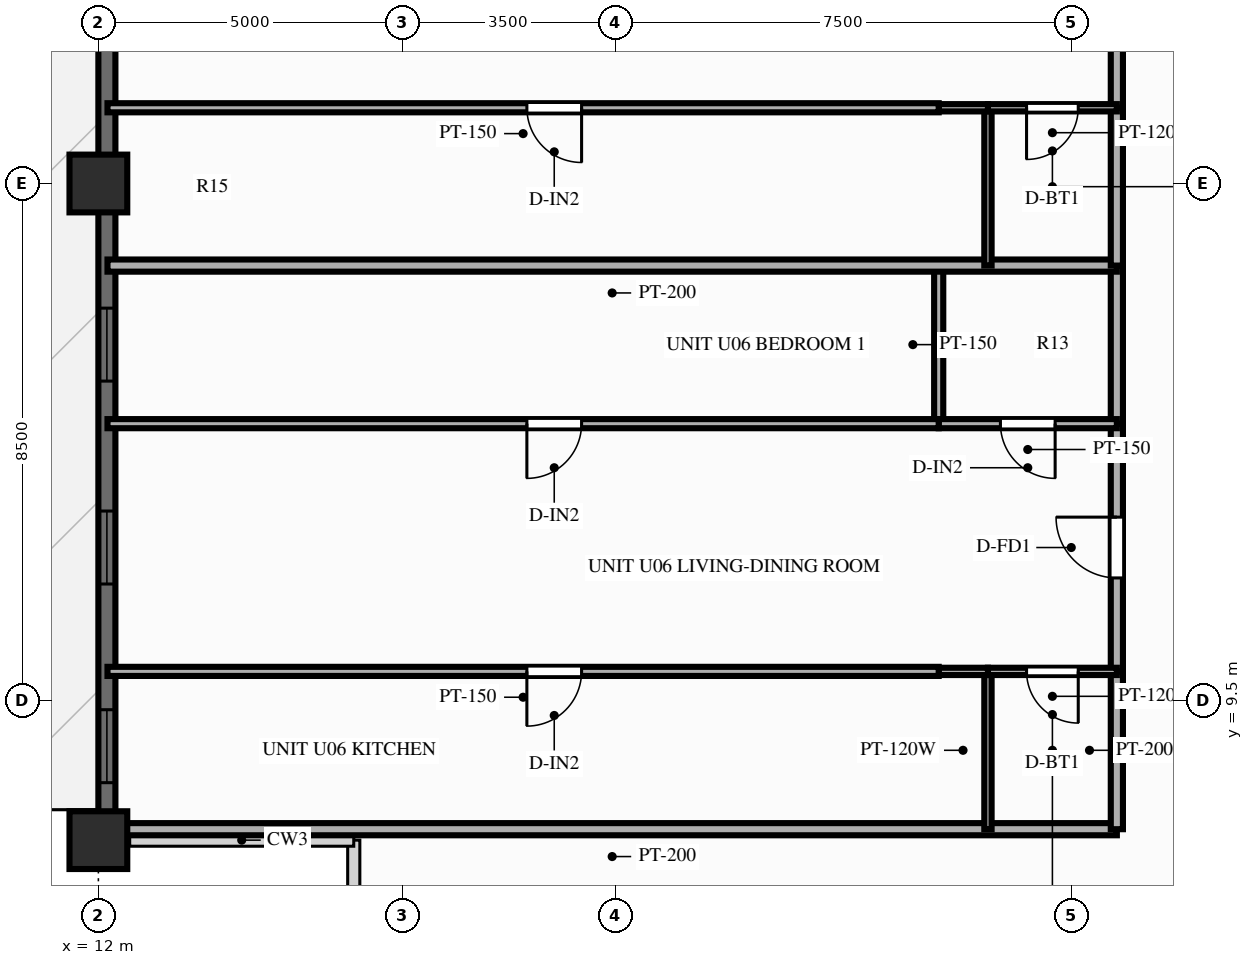
"""IFC4 building model, lengths in metres.
Left out: names, types, materials, properties, quantities, classifications, styles, units other than length and angle.
Written with IfcOpenShell. Run it as: python <this file> out.ifc"""

import sys

from ifc_helpers import new_model, si_unit, direction, frame, frame_2d, origin, origin_2d, place, context, subcontext, project, spatial, rectangle, extrude, source, transform, mapped, element, fill, save


model = new_model("IFC4")
c1 = context("Model", 3, precision=1e-05, world=origin(), true_north=direction((0.0, 1.0)))
c2 = subcontext(c1, "Body", "Model", "MODEL_VIEW")
j1 = project(units=[si_unit("LENGTHUNIT", "METRE"), si_unit("PLANEANGLEUNIT", "RADIAN")], contexts=[c1])
p1 = place(None, origin())
s1 = spatial("IfcSite", under=j1, at=p1, CompositionType="ELEMENT")
p2 = place(p1, origin())
s2 = spatial("IfcBuilding", under=s1, at=p2, CompositionType="ELEMENT")
p3 = place(p2, frame((0.0, 0.0, 107.85)))
s3 = spatial("IfcBuildingStorey", under=s2, at=p3, CompositionType="ELEMENT", Elevation=107.85)
m1 = source(origin(), c2, "Body", "SweptSolid", [
    extrude(rectangle(XDim=0.95, YDim=0.95, at=origin_2d()), origin(), (0.0, 0.0, 1.0), 3.0),
])
for number, where, z_axis, x_axis in (
    (1, (12.0, 18.0, 0.0), (0.0, 0.0, 1.0), (1.0, 0.0, 0.0)),
    (2, (12.0, 7.2, 0.0), (0.0, 0.0, 1.0), (1.0, 0.0, 0.0)),
):
    element("IfcColumn", number, at=place(p3, frame(where, z_axis=z_axis, x_axis=x_axis)), inside=s3, PredefinedType="COLUMN", context=c2, shape_type="MappedRepresentation", body=[
        mapped(m1, transform((0.0, 0.0, 0.0), scale=1.0)),
    ])
p4 = place(p3, frame((12.14, 7.2, 0.0), z_axis=(0.0, 0.0, 1.0), x_axis=(0.0, 1.0, 0.0)))
e3 = element("IfcWall", 3, at=p4, inside=s3, PredefinedType="SOLIDWALL", context=c2, shape_type="SweptSolid", body=[
    extrude(rectangle(XDim=39.6, YDim=0.28, at=frame_2d((19.8, 0.0))), origin(), (0.0, 0.0, 1.0), 2.28),
])
p5 = place(p4, frame((0.945, 0.0, 0.25)))
e4 = element("IfcOpeningElement", 4, at=p5, cuts=e3, PredefinedType="OPENING", context=c2, shape_type="SweptSolid", body=[
    extrude(rectangle(XDim=1.2, YDim=1.5, at=frame_2d((0.6, 0.75))), frame((0.0, 0.152, 0.0), z_axis=(0.0, -1.0, 0.0), x_axis=(1.0, 0.0, 0.0)), (0.0, 0.0, 1.0), 0.304),
])
p6 = place(p4, frame((4.213, 0.0, 0.25)))
e5 = element("IfcOpeningElement", 5, at=p6, cuts=e3, PredefinedType="OPENING", context=c2, shape_type="SweptSolid", body=[
    extrude(rectangle(XDim=1.2, YDim=1.5, at=frame_2d((0.6, 0.75))), frame((0.0, 0.152, 0.0), z_axis=(0.0, -1.0, 0.0), x_axis=(1.0, 0.0, 0.0)), (0.0, 0.0, 1.0), 0.304),
])
p7 = place(p4, frame((7.55, 0.0, 0.25)))
e6 = element("IfcOpeningElement", 6, at=p7, cuts=e3, PredefinedType="OPENING", context=c2, shape_type="SweptSolid", body=[
    extrude(rectangle(XDim=1.2, YDim=1.5, at=frame_2d((0.6, 0.75))), frame((0.0, 0.152, 0.0), z_axis=(0.0, -1.0, 0.0), x_axis=(1.0, 0.0, 0.0)), (0.0, 0.0, 1.0), 0.304),
])
p8 = place(p4, frame((13.483, 0.0, 0.25)))
e7 = element("IfcOpeningElement", 7, at=p8, cuts=e3, PredefinedType="OPENING", context=c2, shape_type="SweptSolid", body=[
    extrude(rectangle(XDim=1.2, YDim=1.5, at=frame_2d((0.6, 0.75))), frame((0.0, 0.152, 0.0), z_axis=(0.0, -1.0, 0.0), x_axis=(1.0, 0.0, 0.0)), (0.0, 0.0, 1.0), 0.304),
])
p9 = place(p4, frame((16.82, 0.0, 0.25)))
e8 = element("IfcOpeningElement", 8, at=p9, cuts=e3, PredefinedType="OPENING", context=c2, shape_type="SweptSolid", body=[
    extrude(rectangle(XDim=1.2, YDim=1.5, at=frame_2d((0.6, 0.75))), frame((0.0, 0.152, 0.0), z_axis=(0.0, -1.0, 0.0), x_axis=(1.0, 0.0, 0.0)), (0.0, 0.0, 1.0), 0.304),
])
p10 = place(p4, frame((19.2, 0.0, 0.25)))
e9 = element("IfcOpeningElement", 9, at=p10, cuts=e3, PredefinedType="OPENING", context=c2, shape_type="SweptSolid", body=[
    extrude(rectangle(XDim=1.2, YDim=1.5, at=frame_2d((0.6, 0.75))), frame((0.0, 0.152, 0.0), z_axis=(0.0, -1.0, 0.0), x_axis=(1.0, 0.0, 0.0)), (0.0, 0.0, 1.0), 0.304),
])
p11 = place(p4, frame((21.578, 0.0, 0.25)))
e10 = element("IfcOpeningElement", 10, at=p11, cuts=e3, PredefinedType="OPENING", context=c2, shape_type="SweptSolid", body=[
    extrude(rectangle(XDim=1.2, YDim=1.5, at=frame_2d((0.6, 0.75))), frame((0.0, 0.152, 0.0), z_axis=(0.0, -1.0, 0.0), x_axis=(1.0, 0.0, 0.0)), (0.0, 0.0, 1.0), 0.304),
])
p12 = place(p4, frame((24.713, 0.0, 0.0)))
e11 = element("IfcOpeningElement", 11, at=p12, cuts=e3, PredefinedType="OPENING", context=c2, shape_type="SweptSolid", body=[
    extrude(rectangle(XDim=1.6, YDim=2.15, at=frame_2d((0.8, 1.075))), frame((0.0, 0.152, 0.0), z_axis=(0.0, -1.0, 0.0), x_axis=(1.0, 0.0, 0.0)), (0.0, 0.0, 1.0), 0.304),
])
p13 = place(p4, frame((29.305, 0.0, 0.25)))
e12 = element("IfcOpeningElement", 12, at=p13, cuts=e3, PredefinedType="OPENING", context=c2, shape_type="SweptSolid", body=[
    extrude(rectangle(XDim=0.7, YDim=1.5, at=frame_2d((0.35, 0.75))), frame((0.0, 0.152, 0.0), z_axis=(0.0, -1.0, 0.0), x_axis=(1.0, 0.0, 0.0)), (0.0, 0.0, 1.0), 0.304),
])
p14 = place(p4, frame((30.848, 0.0, 0.25)))
e13 = element("IfcOpeningElement", 13, at=p14, cuts=e3, PredefinedType="OPENING", context=c2, shape_type="SweptSolid", body=[
    extrude(rectangle(XDim=1.2, YDim=1.5, at=frame_2d((0.6, 0.75))), frame((0.0, 0.152, 0.0), z_axis=(0.0, -1.0, 0.0), x_axis=(1.0, 0.0, 0.0)), (0.0, 0.0, 1.0), 0.304),
])
p15 = place(p4, frame((34.183, 0.0, 0.25)))
e14 = element("IfcOpeningElement", 14, at=p15, cuts=e3, PredefinedType="OPENING", context=c2, shape_type="SweptSolid", body=[
    extrude(rectangle(XDim=1.2, YDim=1.5, at=frame_2d((0.6, 0.75))), frame((0.0, 0.152, 0.0), z_axis=(0.0, -1.0, 0.0), x_axis=(1.0, 0.0, 0.0)), (0.0, 0.0, 1.0), 0.304),
])
p16 = place(p4, frame((37.452, 0.0, 0.25)))
e15 = element("IfcOpeningElement", 15, at=p16, cuts=e3, PredefinedType="OPENING", context=c2, shape_type="SweptSolid", body=[
    extrude(rectangle(XDim=1.2, YDim=1.5, at=frame_2d((0.6, 0.75))), frame((0.0, 0.152, 0.0), z_axis=(0.0, -1.0, 0.0), x_axis=(1.0, 0.0, 0.0)), (0.0, 0.0, 1.0), 0.304),
])
p17 = place(p3, frame((28.75, 7.38, 0.0), z_axis=(0.0, 0.0, 1.0), x_axis=(-1.0, 0.0, 0.0)))
e16 = element("IfcWall", 16, at=p17, inside=s3, PredefinedType="PARTITIONING", context=c2, shape_type="SweptSolid", body=[
    extrude(rectangle(XDim=16.6, YDim=0.2, at=frame_2d((8.3, 0.0))), origin(), (0.0, 0.0, 1.0), 2.79),
])
p18 = place(p3, frame((28.75, 7.38, 0.0), z_axis=(0.0, 0.0, 1.0), x_axis=(0.0, 1.0, 0.0)))
e17 = element("IfcWall", 17, at=p18, inside=s3, PredefinedType="PARTITIONING", context=c2, shape_type="SweptSolid", body=[
    extrude(rectangle(XDim=2.596, YDim=0.2, at=frame_2d((1.298, 0.0))), origin(), (0.0, 0.0, 1.0), 2.79),
])
p19 = place(p3, frame((28.75, 9.976, 0.0), z_axis=(0.0, 0.0, 1.0), x_axis=(0.0, 1.0, 0.0)))
e18 = element("IfcWall", 18, at=p19, inside=s3, PredefinedType="PARTITIONING", context=c2, shape_type="SweptSolid", body=[
    extrude(rectangle(XDim=4.074, YDim=0.2, at=frame_2d((2.037, 0.0))), origin(), (0.0, 0.0, 1.0), 2.79),
])
p20 = place(p19, frame((1.537, 0.0, 0.0)))
e19 = element("IfcOpeningElement", 19, at=p20, cuts=e18, PredefinedType="OPENING", context=c2, shape_type="SweptSolid", body=[
    extrude(rectangle(XDim=1.0, YDim=2.15, at=frame_2d((0.5, 1.075))), frame((0.0, 0.112, 0.0), z_axis=(0.0, -1.0, 0.0), x_axis=(1.0, 0.0, 0.0)), (0.0, 0.0, 1.0), 0.224),
])
p21 = place(p3, frame((28.75, 14.05, 0.0), z_axis=(0.0, 0.0, 1.0), x_axis=(0.0, 1.0, 0.0)))
e20 = element("IfcWall", 20, at=p21, inside=s3, PredefinedType="PARTITIONING", context=c2, shape_type="SweptSolid", body=[
    extrude(rectangle(XDim=2.6, YDim=0.2, at=frame_2d((1.3, 0.0))), origin(), (0.0, 0.0, 1.0), 2.79),
])
p22 = place(p3, frame((26.63, 7.38, 0.0), z_axis=(0.0, 0.0, 1.0), x_axis=(0.0, 1.0, 0.0)))
e21 = element("IfcWall", 21, at=p22, inside=s3, PredefinedType="PARTITIONING", context=c2, shape_type="SweptSolid", body=[
    extrude(rectangle(XDim=2.596, YDim=0.12, at=frame_2d((1.298, 0.0))), origin(), (0.0, 0.0, 1.0), 2.79),
])
p23 = place(p3, frame((25.82, 14.05, 0.0), z_axis=(0.0, 0.0, 1.0), x_axis=(0.0, 1.0, 0.0)))
e22 = element("IfcWall", 22, at=p23, inside=s3, PredefinedType="PARTITIONING", context=c2, shape_type="SweptSolid", body=[
    extrude(rectangle(XDim=2.6, YDim=0.15, at=frame_2d((1.3, 0.0))), origin(), (0.0, 0.0, 1.0), 2.79),
])
p24 = place(p3, frame((28.75, 9.976, 0.0), z_axis=(0.0, 0.0, 1.0), x_axis=(-1.0, 0.0, 0.0)))
e23 = element("IfcWall", 23, at=p24, inside=s3, PredefinedType="PARTITIONING", context=c2, shape_type="SweptSolid", body=[
    extrude(rectangle(XDim=2.12, YDim=0.12, at=frame_2d((1.06, 0.0))), origin(), (0.0, 0.0, 1.0), 2.79),
])
p25 = place(p24, frame((0.635, 0.0, 0.0)))
e24 = element("IfcOpeningElement", 24, at=p25, cuts=e23, PredefinedType="OPENING", context=c2, shape_type="SweptSolid", body=[
    extrude(rectangle(XDim=0.85, YDim=2.05, at=frame_2d((0.425, 1.025))), frame((0.0, 0.072, 0.0), z_axis=(0.0, -1.0, 0.0), x_axis=(1.0, 0.0, 0.0)), (0.0, 0.0, 1.0), 0.144),
])
p26 = place(p3, frame((26.63, 9.976, 0.0), z_axis=(0.0, 0.0, 1.0), x_axis=(-1.0, 0.0, 0.0)))
e25 = element("IfcWall", 25, at=p26, inside=s3, PredefinedType="PARTITIONING", context=c2, shape_type="SweptSolid", body=[
    extrude(rectangle(XDim=0.81, YDim=0.12, at=frame_2d((0.405, 0.0))), origin(), (0.0, 0.0, 1.0), 2.79),
])
p27 = place(p3, frame((25.82, 9.976, 0.0), z_axis=(0.0, 0.0, 1.0), x_axis=(-1.0, 0.0, 0.0)))
e26 = element("IfcWall", 26, at=p27, inside=s3, PredefinedType="PARTITIONING", context=c2, shape_type="SweptSolid", body=[
    extrude(rectangle(XDim=13.67, YDim=0.15, at=frame_2d((6.835, 0.0))), origin(), (0.0, 0.0, 1.0), 2.79),
])
p28 = place(p27, frame((5.873, 0.0, 0.0)))
e27 = element("IfcOpeningElement", 27, at=p28, cuts=e26, PredefinedType="OPENING", context=c2, shape_type="SweptSolid", body=[
    extrude(rectangle(XDim=0.9, YDim=2.1, at=frame_2d((0.45, 1.05))), frame((0.0, 0.087, 0.0), z_axis=(0.0, -1.0, 0.0), x_axis=(1.0, 0.0, 0.0)), (0.0, 0.0, 1.0), 0.174),
])
p29 = place(p3, frame((28.75, 14.05, 0.0), z_axis=(0.0, 0.0, 1.0), x_axis=(-1.0, 0.0, 0.0)))
e28 = element("IfcWall", 28, at=p29, inside=s3, PredefinedType="PARTITIONING", context=c2, shape_type="SweptSolid", body=[
    extrude(rectangle(XDim=2.93, YDim=0.15, at=frame_2d((1.465, 0.0))), origin(), (0.0, 0.0, 1.0), 2.79),
])
p30 = place(p29, frame((1.015, 0.0, 0.0)))
e29 = element("IfcOpeningElement", 29, at=p30, cuts=e28, PredefinedType="OPENING", context=c2, shape_type="SweptSolid", body=[
    extrude(rectangle(XDim=0.9, YDim=2.1, at=frame_2d((0.45, 1.05))), frame((0.0, 0.087, 0.0), z_axis=(0.0, -1.0, 0.0), x_axis=(1.0, 0.0, 0.0)), (0.0, 0.0, 1.0), 0.174),
])
p31 = place(p3, frame((25.82, 14.05, 0.0), z_axis=(0.0, 0.0, 1.0), x_axis=(-1.0, 0.0, 0.0)))
e30 = element("IfcWall", 30, at=p31, inside=s3, PredefinedType="PARTITIONING", context=c2, shape_type="SweptSolid", body=[
    extrude(rectangle(XDim=13.67, YDim=0.15, at=frame_2d((6.835, 0.0))), origin(), (0.0, 0.0, 1.0), 2.79),
])
p32 = place(p31, frame((5.873, 0.0, 0.0)))
e31 = element("IfcOpeningElement", 31, at=p32, cuts=e30, PredefinedType="OPENING", context=c2, shape_type="SweptSolid", body=[
    extrude(rectangle(XDim=0.9, YDim=2.1, at=frame_2d((0.45, 1.05))), frame((0.0, 0.087, 0.0), z_axis=(0.0, -1.0, 0.0), x_axis=(1.0, 0.0, 0.0)), (0.0, 0.0, 1.0), 0.174),
])
p33 = place(p3, frame((28.75, 16.65, 0.0), z_axis=(0.0, 0.0, 1.0), x_axis=(-1.0, 0.0, 0.0)))
e32 = element("IfcWall", 32, at=p33, inside=s3, PredefinedType="PARTITIONING", context=c2, shape_type="SweptSolid", body=[
    extrude(rectangle(XDim=16.6, YDim=0.2, at=frame_2d((8.3, 0.0))), origin(), (0.0, 0.0, 1.0), 2.79),
])
p34 = place(p3, frame((28.75, 16.65, 0.0), z_axis=(0.0, 0.0, 1.0), x_axis=(0.0, 1.0, 0.0)))
e33 = element("IfcWall", 33, at=p34, inside=s3, PredefinedType="PARTITIONING", context=c2, shape_type="SweptSolid", body=[
    extrude(rectangle(XDim=2.596, YDim=0.2, at=frame_2d((1.298, 0.0))), origin(), (0.0, 0.0, 1.0), 2.79),
])
p35 = place(p3, frame((28.75, 19.246, 0.0), z_axis=(0.0, 0.0, 1.0), x_axis=(0.0, 1.0, 0.0)))
e34 = element("IfcWall", 34, at=p35, inside=s3, PredefinedType="PARTITIONING", context=c2, shape_type="SweptSolid", body=[
    extrude(rectangle(XDim=4.074, YDim=0.2, at=frame_2d((2.037, 0.0))), origin(), (0.0, 0.0, 1.0), 2.79),
])
p36 = place(p35, frame((1.537, 0.0, 0.0)))
e35 = element("IfcOpeningElement", 35, at=p36, cuts=e34, PredefinedType="OPENING", context=c2, shape_type="SweptSolid", body=[
    extrude(rectangle(XDim=1.0, YDim=2.15, at=frame_2d((0.5, 1.075))), frame((0.0, 0.112, 0.0), z_axis=(0.0, -1.0, 0.0), x_axis=(1.0, 0.0, 0.0)), (0.0, 0.0, 1.0), 0.224),
])
p37 = place(p3, frame((26.63, 16.65, 0.0), z_axis=(0.0, 0.0, 1.0), x_axis=(0.0, 1.0, 0.0)))
e36 = element("IfcWall", 36, at=p37, inside=s3, PredefinedType="PARTITIONING", context=c2, shape_type="SweptSolid", body=[
    extrude(rectangle(XDim=2.596, YDim=0.12, at=frame_2d((1.298, 0.0))), origin(), (0.0, 0.0, 1.0), 2.79),
])
p38 = place(p3, frame((28.75, 19.246, 0.0), z_axis=(0.0, 0.0, 1.0), x_axis=(-1.0, 0.0, 0.0)))
e37 = element("IfcWall", 37, at=p38, inside=s3, PredefinedType="PARTITIONING", context=c2, shape_type="SweptSolid", body=[
    extrude(rectangle(XDim=2.12, YDim=0.12, at=frame_2d((1.06, 0.0))), origin(), (0.0, 0.0, 1.0), 2.79),
])
p39 = place(p38, frame((0.635, 0.0, 0.0)))
e38 = element("IfcOpeningElement", 38, at=p39, cuts=e37, PredefinedType="OPENING", context=c2, shape_type="SweptSolid", body=[
    extrude(rectangle(XDim=0.85, YDim=2.05, at=frame_2d((0.425, 1.025))), frame((0.0, 0.072, 0.0), z_axis=(0.0, -1.0, 0.0), x_axis=(1.0, 0.0, 0.0)), (0.0, 0.0, 1.0), 0.144),
])
p40 = place(p3, frame((26.63, 19.246, 0.0), z_axis=(0.0, 0.0, 1.0), x_axis=(-1.0, 0.0, 0.0)))
e39 = element("IfcWall", 39, at=p40, inside=s3, PredefinedType="PARTITIONING", context=c2, shape_type="SweptSolid", body=[
    extrude(rectangle(XDim=0.81, YDim=0.12, at=frame_2d((0.405, 0.0))), origin(), (0.0, 0.0, 1.0), 2.79),
])
p41 = place(p3, frame((25.82, 19.246, 0.0), z_axis=(0.0, 0.0, 1.0), x_axis=(-1.0, 0.0, 0.0)))
e40 = element("IfcWall", 40, at=p41, inside=s3, PredefinedType="PARTITIONING", context=c2, shape_type="SweptSolid", body=[
    extrude(rectangle(XDim=13.67, YDim=0.15, at=frame_2d((6.835, 0.0))), origin(), (0.0, 0.0, 1.0), 2.79),
])
p42 = place(p41, frame((5.873, 0.0, 0.0)))
e41 = element("IfcOpeningElement", 41, at=p42, cuts=e40, PredefinedType="OPENING", context=c2, shape_type="SweptSolid", body=[
    extrude(rectangle(XDim=0.9, YDim=2.1, at=frame_2d((0.45, 1.05))), frame((0.0, 0.087, 0.0), z_axis=(0.0, -1.0, 0.0), x_axis=(1.0, 0.0, 0.0)), (0.0, 0.0, 1.0), 0.174),
])
m2 = source(origin(), c2, "Body", "SweptSolid", [
    extrude(rectangle(XDim=1.2, YDim=1.5, at=frame_2d((0.6, 0.75))), frame((0.0, 0.03, 0.0), z_axis=(0.0, -1.0, 0.0), x_axis=(1.0, 0.0, 0.0)), (0.0, 0.0, 1.0), 0.06),
])
p43 = place(p5, origin())
e42 = element("IfcWindow", 42, at=p43, inside=s3, PartitioningType="SINGLE_PANEL", PredefinedType="WINDOW", context=c2, shape_type="MappedRepresentation", body=[
    mapped(m2, transform((0.0, 0.0, 0.0), scale=1.0)),
])
fill(e4, e42)
p44 = place(p6, origin())
e43 = element("IfcWindow", 43, at=p44, inside=s3, PartitioningType="SINGLE_PANEL", PredefinedType="WINDOW", context=c2, shape_type="MappedRepresentation", body=[
    mapped(m2, transform((0.0, 0.0, 0.0), scale=1.0)),
])
fill(e5, e43)
p45 = place(p7, origin())
e44 = element("IfcWindow", 44, at=p45, inside=s3, PartitioningType="SINGLE_PANEL", PredefinedType="WINDOW", context=c2, shape_type="MappedRepresentation", body=[
    mapped(m2, transform((0.0, 0.0, 0.0), scale=1.0)),
])
fill(e6, e44)
m3 = source(origin(), c2, "Body", "SweptSolid", [
    extrude(rectangle(XDim=1.0, YDim=2.15, at=frame_2d((0.5, 1.075))), frame((0.0, 0.025, 0.0), z_axis=(0.0, -1.0, 0.0), x_axis=(1.0, 0.0, 0.0)), (0.0, 0.0, 1.0), 0.05),
])
p46 = place(p20, origin())
e45 = element("IfcDoor", 45, at=p46, inside=s3, OperationType="SINGLE_SWING_RIGHT", PredefinedType="DOOR", context=c2, shape_type="MappedRepresentation", body=[
    mapped(m3, transform((0.0, 0.0, 0.0), scale=1.0)),
])
fill(e19, e45)
m4 = source(origin(), c2, "Body", "SweptSolid", [
    extrude(rectangle(XDim=0.85, YDim=2.05, at=frame_2d((0.425, 1.025))), frame((0.0, 0.025, 0.0), z_axis=(0.0, -1.0, 0.0), x_axis=(1.0, 0.0, 0.0)), (0.0, 0.0, 1.0), 0.05),
])
p47 = place(p25, origin())
e46 = element("IfcDoor", 46, at=p47, inside=s3, OperationType="SINGLE_SWING_LEFT", PredefinedType="DOOR", context=c2, shape_type="MappedRepresentation", body=[
    mapped(m4, transform((0.0, 0.0, 0.0), scale=1.0)),
])
fill(e24, e46)
m5 = source(origin(), c2, "Body", "SweptSolid", [
    extrude(rectangle(XDim=0.9, YDim=2.1, at=frame_2d((0.45, 1.05))), frame((0.0, 0.025, 0.0), z_axis=(0.0, -1.0, 0.0), x_axis=(1.0, 0.0, 0.0)), (0.0, 0.0, 1.0), 0.05),
])
p48 = place(p28, origin())
e47 = element("IfcDoor", 47, at=p48, inside=s3, OperationType="SINGLE_SWING_RIGHT", PredefinedType="DOOR", context=c2, shape_type="MappedRepresentation", body=[
    mapped(m5, transform((0.0, 0.0, 0.0), scale=1.0)),
])
fill(e27, e47)
p49 = place(p30, origin())
e48 = element("IfcDoor", 48, at=p49, inside=s3, OperationType="SINGLE_SWING_LEFT", PredefinedType="DOOR", context=c2, shape_type="MappedRepresentation", body=[
    mapped(m5, transform((0.0, 0.0, 0.0), scale=1.0)),
])
fill(e29, e48)
p50 = place(p32, origin())
e49 = element("IfcDoor", 49, at=p50, inside=s3, OperationType="SINGLE_SWING_RIGHT", PredefinedType="DOOR", context=c2, shape_type="MappedRepresentation", body=[
    mapped(m5, transform((0.0, 0.0, 0.0), scale=1.0)),
])
fill(e31, e49)
p51 = place(p39, origin())
e50 = element("IfcDoor", 50, at=p51, inside=s3, OperationType="SINGLE_SWING_RIGHT", PredefinedType="DOOR", context=c2, shape_type="MappedRepresentation", body=[
    mapped(m4, transform((0.0, 0.0, 0.0), scale=1.0)),
])
fill(e38, e50)
p52 = place(p42, origin())
e51 = element("IfcDoor", 51, at=p52, inside=s3, OperationType="SINGLE_SWING_LEFT", PredefinedType="DOOR", context=c2, shape_type="MappedRepresentation", body=[
    mapped(m5, transform((0.0, 0.0, 0.0), scale=1.0)),
])
fill(e41, e51)
save(model, sys.argv[1])
